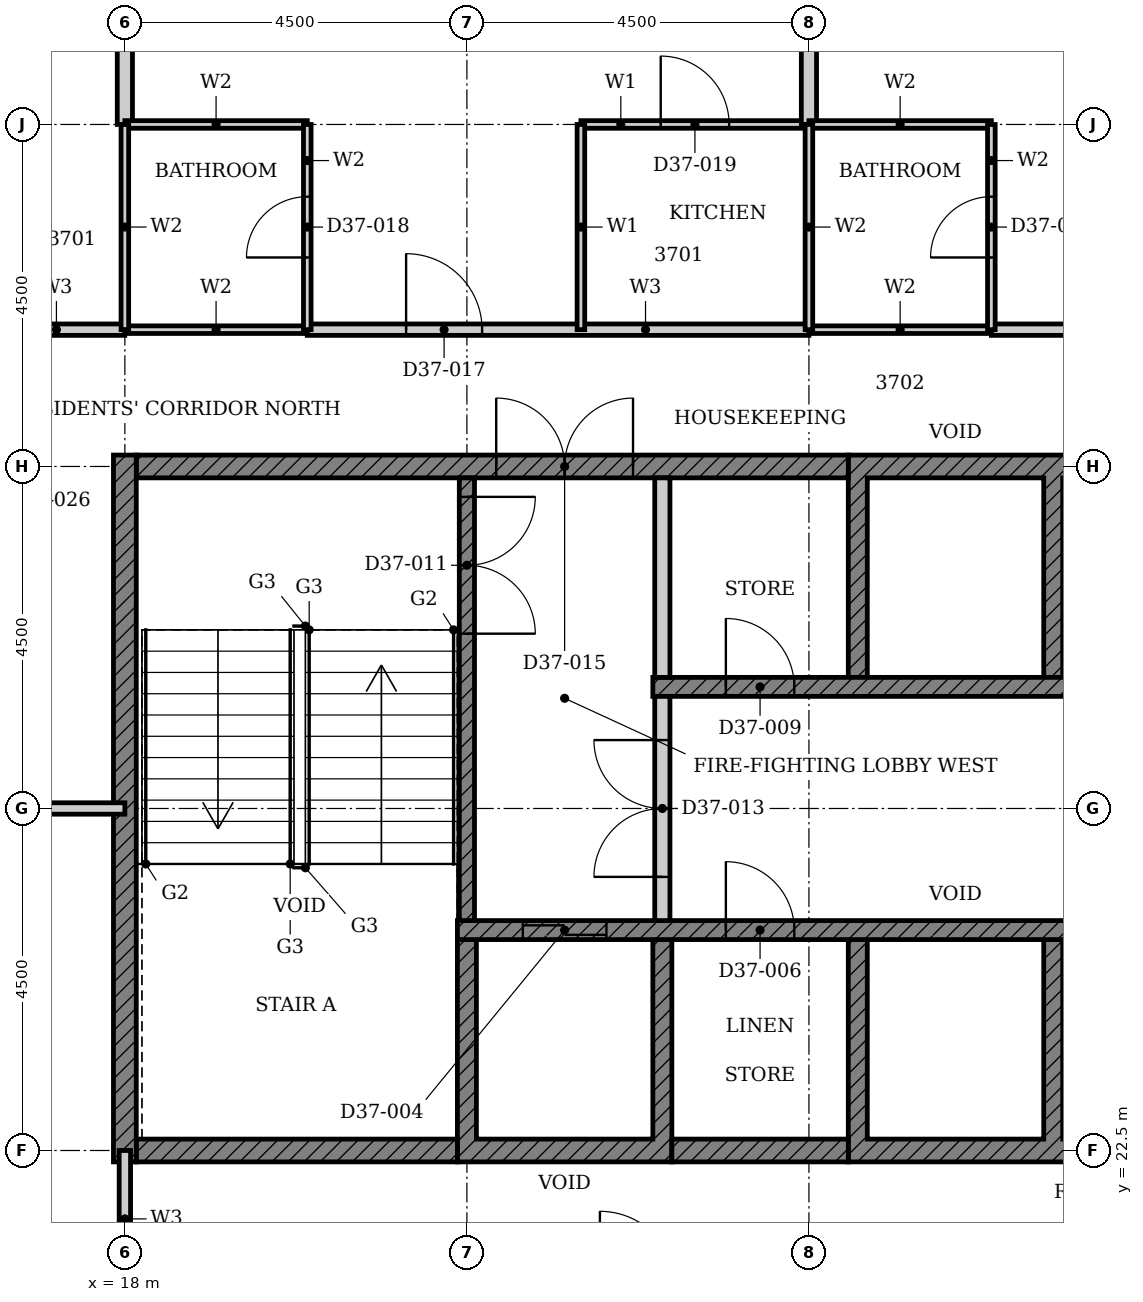
"""IFC4 building model, lengths in metres.
Left out: names, types, materials, properties, quantities, classifications, styles, units other than length and angle.
Written with IfcOpenShell. Run it as: python <this file> out.ifc"""

import sys

from ifc_helpers import new_model, si_unit, direction, frame, frame_2d, origin, place, context, subcontext, project, spatial, polyline, rectangle, outline, extrude, element, fill, save


model = new_model("IFC4")
c1 = context("Model", 3, precision=1e-05, world=origin(), true_north=direction((0.0, 1.0)))
c2 = subcontext(c1, "Body", "Model", "MODEL_VIEW")
j1 = project(units=[si_unit("LENGTHUNIT", "METRE"), si_unit("PLANEANGLEUNIT", "RADIAN")], contexts=[c1])
p1 = place(None, origin())
s1 = spatial("IfcSite", under=j1, at=p1, CompositionType="ELEMENT")
p2 = place(p1, origin())
s2 = spatial("IfcBuilding", under=s1, at=p2, CompositionType="ELEMENT")
p3 = place(p2, frame((0.0, 0.0, 150.6)))
s3 = spatial("IfcBuildingStorey", under=s2, at=p3, CompositionType="ELEMENT", Elevation=150.6)
p4 = place(p3, origin())
e1 = element("IfcWall", 1, at=p4, inside=s3, PredefinedType="SHEAR", context=c2, shape_type="SweptSolid", body=[
    extrude(outline(polyline([(22.375, 22.35), (25.197, 22.35), (25.197, 25.275), (24.947, 25.275), (24.947, 22.65), (22.625, 22.65), (22.625, 25.275), (22.375, 25.275), (22.375, 22.35)])), origin(), (0.0, 0.0, 1.0), 3.4),
])
p5 = place(p3, origin())
e2 = element("IfcWall", 2, at=p5, inside=s3, PredefinedType="SHEAR", context=c2, shape_type="SweptSolid", body=[
    extrude(outline(polyline([(27.518, 22.35), (32.911, 22.35), (32.911, 25.275), (32.661, 25.275), (32.661, 22.65), (30.339, 22.65), (30.339, 25.275), (30.089, 25.275), (30.089, 22.65), (27.768, 22.65), (27.768, 25.275), (27.518, 25.275), (27.518, 22.35)])), origin(), (0.0, 0.0, 1.0), 3.4),
])
p6 = place(p3, origin())
e3 = element("IfcWall", 3, at=p6, inside=s3, PredefinedType="SHEAR", context=c2, shape_type="SweptSolid", body=[
    extrude(outline(polyline([(27.518, 28.725), (27.768, 28.725), (27.768, 31.35), (30.089, 31.35), (30.089, 28.725), (30.339, 28.725), (30.339, 31.35), (32.661, 31.35), (32.661, 28.725), (32.911, 28.725), (32.911, 31.65), (27.518, 31.65), (27.518, 28.725)])), origin(), (0.0, 0.0, 1.0), 3.4),
])
p7 = place(p3, frame((18.15, 22.5, 0.0), z_axis=(0.0, 0.0, 1.0), x_axis=(1.0, 0.0, 0.0)))
e4 = element("IfcWall", 4, at=p7, inside=s3, PredefinedType="SHEAR", context=c2, shape_type="SweptSolid", body=[
    extrude(rectangle(XDim=4.225, YDim=0.3, at=frame_2d((2.113, 0.0))), origin(), (0.0, 0.0, 1.0), 3.4),
])
p8 = place(p3, frame((25.197, 22.5, 0.0), z_axis=(0.0, 0.0, 1.0), x_axis=(1.0, 0.0, 0.0)))
e5 = element("IfcWall", 5, at=p8, inside=s3, PredefinedType="SHEAR", context=c2, shape_type="SweptSolid", body=[
    extrude(rectangle(XDim=2.321, YDim=0.3, at=frame_2d((1.161, 0.0))), origin(), (0.0, 0.0, 1.0), 3.4),
])
p9 = place(p3, frame((18.15, 31.5, 0.0), z_axis=(0.0, 0.0, 1.0), x_axis=(1.0, 0.0, 0.0)))
e6 = element("IfcWall", 6, at=p9, inside=s3, PredefinedType="SHEAR", context=c2, shape_type="SweptSolid", body=[
    extrude(rectangle(XDim=9.368, YDim=0.3, at=frame_2d((4.684, 0.0))), origin(), (0.0, 0.0, 1.0), 3.4),
])
p10 = place(p9, frame((4.736, 0.0, 0.0)))
e7 = element("IfcOpeningElement", 7, at=p10, cuts=e6, PredefinedType="OPENING", context=c2, shape_type="SweptSolid", body=[
    extrude(rectangle(XDim=1.8, YDim=2.1, at=frame_2d((0.9, 1.05))), frame((0.0, 0.16, 0.0), z_axis=(0.0, -1.0, 0.0), x_axis=(1.0, 0.0, 0.0)), (0.0, 0.0, 1.0), 0.32),
])
p11 = place(p3, frame((18.0, 22.35, 0.0), z_axis=(0.0, 0.0, 1.0), x_axis=(0.0, 1.0, 0.0)))
e8 = element("IfcWall", 8, at=p11, inside=s3, PredefinedType="SHEAR", context=c2, shape_type="SweptSolid", body=[
    extrude(rectangle(XDim=9.3, YDim=0.3, at=frame_2d((4.65, 0.0))), origin(), (0.0, 0.0, 1.0), 3.4),
])
p12 = place(p3, frame((22.375, 25.4, 0.0), z_axis=(0.0, 0.0, 1.0), x_axis=(1.0, 0.0, 0.0)))
e9 = element("IfcWall", 9, at=p12, inside=s3, PredefinedType="SHEAR", context=c2, shape_type="SweptSolid", body=[
    extrude(rectangle(XDim=15.678, YDim=0.25, at=frame_2d((7.839, 0.0))), origin(), (0.0, 0.0, 1.0), 3.4),
])
p13 = place(p12, frame((8.575, 0.0, 0.0)))
e10 = element("IfcOpeningElement", 10, at=p13, cuts=e9, PredefinedType="OPENING", context=c2, shape_type="SweptSolid", body=[
    extrude(rectangle(XDim=1.1, YDim=2.1, at=frame_2d((0.55, 1.05))), frame((0.0, 0.135, 0.0), z_axis=(0.0, -1.0, 0.0), x_axis=(1.0, 0.0, 0.0)), (0.0, 0.0, 1.0), 0.27),
])
p14 = place(p12, frame((0.861, 0.0, 0.0)))
e11 = element("IfcOpeningElement", 11, at=p14, cuts=e9, PredefinedType="OPENING", context=c2, shape_type="SweptSolid", body=[
    extrude(rectangle(XDim=1.1, YDim=2.1, at=frame_2d((0.55, 1.05))), frame((0.0, 0.135, 0.0), z_axis=(0.0, -1.0, 0.0), x_axis=(1.0, 0.0, 0.0)), (0.0, 0.0, 1.0), 0.27),
])
p15 = place(p12, frame((3.532, 0.0, 0.0)))
e12 = element("IfcOpeningElement", 12, at=p15, cuts=e9, PredefinedType="OPENING", context=c2, shape_type="SweptSolid", body=[
    extrude(rectangle(XDim=0.9, YDim=2.1, at=frame_2d((0.45, 1.05))), frame((0.0, 0.135, 0.0), z_axis=(0.0, -1.0, 0.0), x_axis=(1.0, 0.0, 0.0)), (0.0, 0.0, 1.0), 0.27),
])
p16 = place(p12, frame((11.246, 0.0, 0.0)))
e13 = element("IfcOpeningElement", 13, at=p16, cuts=e9, PredefinedType="OPENING", context=c2, shape_type="SweptSolid", body=[
    extrude(rectangle(XDim=0.9, YDim=2.1, at=frame_2d((0.45, 1.05))), frame((0.0, 0.135, 0.0), z_axis=(0.0, -1.0, 0.0), x_axis=(1.0, 0.0, 0.0)), (0.0, 0.0, 1.0), 0.27),
])
p17 = place(p12, frame((13.818, 0.0, 0.0)))
e14 = element("IfcOpeningElement", 14, at=p17, cuts=e9, PredefinedType="OPENING", context=c2, shape_type="SweptSolid", body=[
    extrude(rectangle(XDim=0.9, YDim=2.1, at=frame_2d((0.45, 1.05))), frame((0.0, 0.135, 0.0), z_axis=(0.0, -1.0, 0.0), x_axis=(1.0, 0.0, 0.0)), (0.0, 0.0, 1.0), 0.27),
])
p18 = place(p3, frame((24.947, 28.6, 0.0), z_axis=(0.0, 0.0, 1.0), x_axis=(1.0, 0.0, 0.0)))
e15 = element("IfcWall", 15, at=p18, inside=s3, PredefinedType="SHEAR", context=c2, shape_type="SweptSolid", body=[
    extrude(rectangle(XDim=15.678, YDim=0.25, at=frame_2d((7.839, 0.0))), origin(), (0.0, 0.0, 1.0), 3.4),
])
p19 = place(p18, frame((6.004, 0.0, 0.0)))
e16 = element("IfcOpeningElement", 16, at=p19, cuts=e15, PredefinedType="OPENING", context=c2, shape_type="SweptSolid", body=[
    extrude(rectangle(XDim=1.1, YDim=2.1, at=frame_2d((0.55, 1.05))), frame((0.0, 0.135, 0.0), z_axis=(0.0, -1.0, 0.0), x_axis=(1.0, 0.0, 0.0)), (0.0, 0.0, 1.0), 0.27),
])
p20 = place(p18, frame((11.146, 0.0, 0.0)))
e17 = element("IfcOpeningElement", 17, at=p20, cuts=e15, PredefinedType="OPENING", context=c2, shape_type="SweptSolid", body=[
    extrude(rectangle(XDim=1.1, YDim=2.1, at=frame_2d((0.55, 1.05))), frame((0.0, 0.135, 0.0), z_axis=(0.0, -1.0, 0.0), x_axis=(1.0, 0.0, 0.0)), (0.0, 0.0, 1.0), 0.27),
])
p21 = place(p18, frame((13.718, 0.0, 0.0)))
e18 = element("IfcOpeningElement", 18, at=p21, cuts=e15, PredefinedType="OPENING", context=c2, shape_type="SweptSolid", body=[
    extrude(rectangle(XDim=1.1, YDim=2.1, at=frame_2d((0.55, 1.05))), frame((0.0, 0.135, 0.0), z_axis=(0.0, -1.0, 0.0), x_axis=(1.0, 0.0, 0.0)), (0.0, 0.0, 1.0), 0.27),
])
p22 = place(p18, frame((0.961, 0.0, 0.0)))
e19 = element("IfcOpeningElement", 19, at=p22, cuts=e15, PredefinedType="OPENING", context=c2, shape_type="SweptSolid", body=[
    extrude(rectangle(XDim=0.9, YDim=2.1, at=frame_2d((0.45, 1.05))), frame((0.0, 0.135, 0.0), z_axis=(0.0, -1.0, 0.0), x_axis=(1.0, 0.0, 0.0)), (0.0, 0.0, 1.0), 0.27),
])
p23 = place(p18, frame((8.675, 0.0, 0.0)))
e20 = element("IfcOpeningElement", 20, at=p23, cuts=e15, PredefinedType="OPENING", context=c2, shape_type="SweptSolid", body=[
    extrude(rectangle(XDim=0.9, YDim=2.1, at=frame_2d((0.45, 1.05))), frame((0.0, 0.135, 0.0), z_axis=(0.0, -1.0, 0.0), x_axis=(1.0, 0.0, 0.0)), (0.0, 0.0, 1.0), 0.27),
])
p24 = place(p3, frame((25.072, 28.725, 0.0), z_axis=(0.0, 0.0, 1.0), x_axis=(0.0, 1.0, 0.0)))
e21 = element("IfcWall", 21, at=p24, inside=s3, PredefinedType="PARTITIONING", context=c2, shape_type="SweptSolid", body=[
    extrude(rectangle(XDim=2.625, YDim=0.2, at=frame_2d((1.312, 0.0))), origin(), (0.0, 0.0, 1.0), 3.4),
])
p25 = place(p3, frame((22.5, 31.35, 0.0), z_axis=(0.0, 0.0, 1.0), x_axis=(0.0, -1.0, 0.0)))
e22 = element("IfcWall", 22, at=p25, inside=s3, PredefinedType="SHEAR", context=c2, shape_type="SweptSolid", body=[
    extrude(rectangle(XDim=5.825, YDim=0.2, at=frame_2d((2.913, 0.0))), origin(), (0.0, 0.0, 1.0), 3.4),
])
p26 = place(p25, frame((0.25, 0.0, 0.0)))
e23 = element("IfcOpeningElement", 23, at=p26, cuts=e22, PredefinedType="OPENING", context=c2, shape_type="SweptSolid", body=[
    extrude(rectangle(XDim=1.8, YDim=2.1, at=frame_2d((0.9, 1.05))), frame((0.0, 0.11, 0.0), z_axis=(0.0, -1.0, 0.0), x_axis=(1.0, 0.0, 0.0)), (0.0, 0.0, 1.0), 0.22),
])
p27 = place(p3, frame((25.072, 25.525, 0.0), z_axis=(0.0, 0.0, 1.0), x_axis=(0.0, 1.0, 0.0)))
e24 = element("IfcWall", 24, at=p27, inside=s3, PredefinedType="PARTITIONING", context=c2, shape_type="SweptSolid", body=[
    extrude(rectangle(XDim=2.95, YDim=0.2, at=frame_2d((1.475, 0.0))), origin(), (0.0, 0.0, 1.0), 3.4),
])
p28 = place(p27, frame((0.575, 0.0, 0.0)))
e25 = element("IfcOpeningElement", 25, at=p28, cuts=e24, PredefinedType="OPENING", context=c2, shape_type="SweptSolid", body=[
    extrude(rectangle(XDim=1.8, YDim=2.1, at=frame_2d((0.9, 1.05))), frame((0.0, 0.11, 0.0), z_axis=(0.0, -1.0, 0.0), x_axis=(1.0, 0.0, 0.0)), (0.0, 0.0, 1.0), 0.22),
])
p29 = place(p3, frame((4.5, 27.0, 0.0), z_axis=(0.0, 0.0, 1.0), x_axis=(1.0, 0.0, 0.0)))
e26 = element("IfcWall", 26, at=p29, inside=s3, PredefinedType="PARTITIONING", context=c2, shape_type="SweptSolid", body=[
    extrude(rectangle(XDim=13.5, YDim=0.15, at=frame_2d((6.75, 0.0))), origin(), (0.0, 0.0, 1.0), 2.68),
])
p30 = place(p29, frame((5.35, 0.0, 0.0)))
e27 = element("IfcOpeningElement", 27, at=p30, cuts=e26, PredefinedType="OPENING", context=c2, shape_type="SweptSolid", body=[
    extrude(rectangle(XDim=1.0, YDim=2.1, at=frame_2d((0.5, 1.05))), frame((0.0, 0.085, 0.0), z_axis=(0.0, -1.0, 0.0), x_axis=(1.0, 0.0, 0.0)), (0.0, 0.0, 1.0), 0.17),
])
p31 = place(p3, frame((20.4, 33.3, 0.0), z_axis=(0.0, 0.0, 1.0), x_axis=(1.0, 0.0, 0.0)))
e28 = element("IfcWall", 28, at=p31, inside=s3, PredefinedType="PARTITIONING", context=c2, shape_type="SweptSolid", body=[
    extrude(rectangle(XDim=6.6, YDim=0.15, at=frame_2d((3.3, 0.0))), origin(), (0.0, 0.0, 1.0), 3.4),
])
p32 = place(p31, frame((1.3, 0.0, 0.0)))
e29 = element("IfcOpeningElement", 29, at=p32, cuts=e28, PredefinedType="OPENING", context=c2, shape_type="SweptSolid", body=[
    extrude(rectangle(XDim=1.0, YDim=2.2, at=frame_2d((0.5, 1.1))), frame((0.0, 0.085, 0.0), z_axis=(0.0, -1.0, 0.0), x_axis=(1.0, 0.0, 0.0)), (0.0, 0.0, 1.0), 0.17),
])
p33 = place(p3, frame((29.4, 33.3, 0.0), z_axis=(0.0, 0.0, 1.0), x_axis=(1.0, 0.0, 0.0)))
e30 = element("IfcWall", 30, at=p33, inside=s3, PredefinedType="PARTITIONING", context=c2, shape_type="SweptSolid", body=[
    extrude(rectangle(XDim=6.6, YDim=0.15, at=frame_2d((3.3, 0.0))), origin(), (0.0, 0.0, 1.0), 3.4),
])
p34 = place(p33, frame((1.3, 0.0, 0.0)))
e31 = element("IfcOpeningElement", 31, at=p34, cuts=e30, PredefinedType="OPENING", context=c2, shape_type="SweptSolid", body=[
    extrude(rectangle(XDim=1.0, YDim=2.2, at=frame_2d((0.5, 1.1))), frame((0.0, 0.085, 0.0), z_axis=(0.0, -1.0, 0.0), x_axis=(1.0, 0.0, 0.0)), (0.0, 0.0, 1.0), 0.17),
])
p35 = place(p3, frame((16.2, 33.3, 0.0), z_axis=(0.0, 0.0, 1.0), x_axis=(1.0, 0.0, 0.0)))
e32 = element("IfcWall", 32, at=p35, inside=s3, PredefinedType="PARTITIONING", context=c2, shape_type="SweptSolid", body=[
    extrude(rectangle(XDim=1.799, YDim=0.15, at=frame_2d((0.899, 0.0))), origin(), (0.0, 0.0, 1.0), 3.4),
])
p36 = place(p3, frame((18.0, 20.7, 0.0), z_axis=(0.0, 0.0, 1.0), x_axis=(0.0, 1.0, 0.0)))
e33 = element("IfcWall", 33, at=p36, inside=s3, PredefinedType="PARTITIONING", context=c2, shape_type="SweptSolid", body=[
    extrude(rectangle(XDim=1.8, YDim=0.15, at=frame_2d((0.9, 0.0))), origin(), (0.0, 0.0, 1.0), 3.4),
])
p37 = place(p3, frame((24.0, 36.0, 0.0), z_axis=(0.0, 0.0, 1.0), x_axis=(1.0, 0.0, 0.0)))
e34 = element("IfcWall", 34, at=p37, inside=s3, PredefinedType="PARTITIONING", context=c2, shape_type="SweptSolid", body=[
    extrude(rectangle(XDim=3.0, YDim=0.1, at=frame_2d((1.5, 0.0))), origin(), (0.0, 0.0, 1.0), 3.4),
])
p38 = place(p37, frame((1.05, 0.0, 0.0)))
e35 = element("IfcOpeningElement", 35, at=p38, cuts=e34, PredefinedType="OPENING", context=c2, shape_type="SweptSolid", body=[
    extrude(rectangle(XDim=0.9, YDim=2.1, at=frame_2d((0.45, 1.05))), frame((0.0, 0.06, 0.0), z_axis=(0.0, -1.0, 0.0), x_axis=(1.0, 0.0, 0.0)), (0.0, 0.0, 1.0), 0.12),
])
p39 = place(p3, frame((24.0, 33.3, 0.0), z_axis=(0.0, 0.0, 1.0), x_axis=(0.0, 1.0, 0.0)))
e36 = element("IfcWall", 36, at=p39, inside=s3, PredefinedType="PARTITIONING", context=c2, shape_type="SweptSolid", body=[
    extrude(rectangle(XDim=2.7, YDim=0.1, at=frame_2d((1.35, 0.0))), origin(), (0.0, 0.0, 1.0), 3.4),
])
p40 = place(p3, frame((18.0, 36.0, 0.0), z_axis=(0.0, 0.0, 1.0), x_axis=(0.0, 1.0, 0.0)))
e37 = element("IfcWall", 37, at=p40, inside=s3, PredefinedType="PARTITIONING", context=c2, shape_type="SweptSolid", body=[
    extrude(rectangle(XDim=2.44, YDim=0.2, at=frame_2d((1.22, 0.0))), origin(), (0.0, 0.0, 1.0), 3.4),
])
p41 = place(p3, frame((27.0, 36.0, 0.0), z_axis=(0.0, 0.0, 1.0), x_axis=(0.0, 1.0, 0.0)))
e38 = element("IfcWall", 38, at=p41, inside=s3, PredefinedType="PARTITIONING", context=c2, shape_type="SweptSolid", body=[
    extrude(rectangle(XDim=4.69, YDim=0.2, at=frame_2d((2.345, 0.0))), origin(), (0.0, 0.0, 1.0), 3.4),
])
for number, where, z_axis, x_axis in (
    (39, (18.0, 33.3, 0.0), (0.0, 0.0, 1.0), (1.0, 0.0, 0.0)),
    (40, (27.0, 33.3, 0.0), (0.0, 0.0, 1.0), (1.0, 0.0, 0.0)),
    (41, (18.0, 36.0, 0.0), (0.0, 0.0, 1.0), (1.0, 0.0, 0.0)),
    (42, (27.0, 36.0, 0.0), (0.0, 0.0, 1.0), (1.0, 0.0, 0.0)),
):
    element("IfcWall", number, at=place(p3, frame(where, z_axis=z_axis, x_axis=x_axis)), inside=s3, PredefinedType="PARTITIONING", context=c2, shape_type="SweptSolid", body=[
        extrude(rectangle(XDim=2.4, YDim=0.1, at=frame_2d((1.2, 0.0))), origin(), (0.0, 0.0, 1.0), 3.4),
    ])
p42 = place(p3, frame((18.0, 33.301, 0.0), z_axis=(0.0, 0.0, 1.0), x_axis=(0.0, 1.0, 0.0)))
e43 = element("IfcWall", 43, at=p42, inside=s3, PredefinedType="PARTITIONING", context=c2, shape_type="SweptSolid", body=[
    extrude(rectangle(XDim=2.699, YDim=0.1, at=frame_2d((1.35, 0.0))), origin(), (0.0, 0.0, 1.0), 3.4),
])
p43 = place(p3, frame((20.4, 33.3, 0.0), z_axis=(0.0, 0.0, 1.0), x_axis=(0.0, 1.0, 0.0)))
e44 = element("IfcWall", 44, at=p43, inside=s3, PredefinedType="PARTITIONING", context=c2, shape_type="SweptSolid", body=[
    extrude(rectangle(XDim=2.7, YDim=0.1, at=frame_2d((1.35, 0.0))), origin(), (0.0, 0.0, 1.0), 3.4),
])
p44 = place(p43, frame((0.95, 0.0, 0.0)))
e45 = element("IfcOpeningElement", 45, at=p44, cuts=e44, PredefinedType="OPENING", context=c2, shape_type="SweptSolid", body=[
    extrude(rectangle(XDim=0.8, YDim=2.1, at=frame_2d((0.4, 1.05))), frame((0.0, 0.06, 0.0), z_axis=(0.0, -1.0, 0.0), x_axis=(1.0, 0.0, 0.0)), (0.0, 0.0, 1.0), 0.12),
])
p45 = place(p3, frame((27.0, 33.3, 0.0), z_axis=(0.0, 0.0, 1.0), x_axis=(0.0, 1.0, 0.0)))
e46 = element("IfcWall", 46, at=p45, inside=s3, PredefinedType="PARTITIONING", context=c2, shape_type="SweptSolid", body=[
    extrude(rectangle(XDim=2.7, YDim=0.1, at=frame_2d((1.35, 0.0))), origin(), (0.0, 0.0, 1.0), 3.4),
])
p46 = place(p3, frame((29.4, 33.3, 0.0), z_axis=(0.0, 0.0, 1.0), x_axis=(0.0, 1.0, 0.0)))
e47 = element("IfcWall", 47, at=p46, inside=s3, PredefinedType="PARTITIONING", context=c2, shape_type="SweptSolid", body=[
    extrude(rectangle(XDim=2.7, YDim=0.1, at=frame_2d((1.35, 0.0))), origin(), (0.0, 0.0, 1.0), 3.4),
])
p47 = place(p46, frame((0.95, 0.0, 0.0)))
e48 = element("IfcOpeningElement", 48, at=p47, cuts=e47, PredefinedType="OPENING", context=c2, shape_type="SweptSolid", body=[
    extrude(rectangle(XDim=0.8, YDim=2.1, at=frame_2d((0.4, 1.05))), frame((0.0, 0.06, 0.0), z_axis=(0.0, -1.0, 0.0), x_axis=(1.0, 0.0, 0.0)), (0.0, 0.0, 1.0), 0.12),
])
p48 = place(p14, origin())
e49 = element("IfcDoor", 49, at=p48, inside=s3, OperationType="DOUBLE_DOOR_SLIDING", PredefinedType="DOOR", context=c2, shape_type="SweptSolid", body=[
    extrude(rectangle(XDim=1.1, YDim=2.1, at=frame_2d((0.55, 1.05))), frame((0.0, 0.025, 0.0), z_axis=(0.0, -1.0, 0.0), x_axis=(1.0, 0.0, 0.0)), (0.0, 0.0, 1.0), 0.05),
])
fill(e11, e49)
p49 = place(p15, origin())
e50 = element("IfcDoor", 50, at=p49, inside=s3, OperationType="SINGLE_SWING_LEFT", PredefinedType="DOOR", context=c2, shape_type="SweptSolid", body=[
    extrude(rectangle(XDim=0.9, YDim=2.1, at=frame_2d((0.45, 1.05))), frame((0.0, 0.025, 0.0), z_axis=(0.0, -1.0, 0.0), x_axis=(1.0, 0.0, 0.0)), (0.0, 0.0, 1.0), 0.05),
])
fill(e12, e50)
p50 = place(p22, origin())
e51 = element("IfcDoor", 51, at=p50, inside=s3, OperationType="SINGLE_SWING_LEFT", PredefinedType="DOOR", context=c2, shape_type="SweptSolid", body=[
    extrude(rectangle(XDim=0.9, YDim=2.1, at=frame_2d((0.45, 1.05))), frame((0.0, 0.025, 0.0), z_axis=(0.0, -1.0, 0.0), x_axis=(1.0, 0.0, 0.0)), (0.0, 0.0, 1.0), 0.05),
])
fill(e19, e51)
p51 = place(p26, origin())
e52 = element("IfcDoor", 52, at=p51, inside=s3, OperationType="DOUBLE_DOOR_SINGLE_SWING", PredefinedType="DOOR", context=c2, shape_type="SweptSolid", body=[
    extrude(rectangle(XDim=1.8, YDim=2.1, at=frame_2d((0.9, 1.05))), frame((0.0, 0.025, 0.0), z_axis=(0.0, -1.0, 0.0), x_axis=(1.0, 0.0, 0.0)), (0.0, 0.0, 1.0), 0.05),
])
fill(e23, e52)
p52 = place(p28, origin())
e53 = element("IfcDoor", 53, at=p52, inside=s3, OperationType="DOUBLE_DOOR_SINGLE_SWING", PredefinedType="DOOR", context=c2, shape_type="SweptSolid", body=[
    extrude(rectangle(XDim=1.8, YDim=2.1, at=frame_2d((0.9, 1.05))), frame((0.0, 0.025, 0.0), z_axis=(0.0, -1.0, 0.0), x_axis=(1.0, 0.0, 0.0)), (0.0, 0.0, 1.0), 0.05),
])
fill(e25, e53)
p53 = place(p10, origin())
e54 = element("IfcDoor", 54, at=p53, inside=s3, OperationType="DOUBLE_DOOR_SINGLE_SWING", PredefinedType="DOOR", context=c2, shape_type="SweptSolid", body=[
    extrude(rectangle(XDim=1.8, YDim=2.1, at=frame_2d((0.9, 1.05))), frame((0.0, 0.025, 0.0), z_axis=(0.0, -1.0, 0.0), x_axis=(1.0, 0.0, 0.0)), (0.0, 0.0, 1.0), 0.05),
])
fill(e7, e54)
p54 = place(p32, origin())
e55 = element("IfcDoor", 55, at=p54, inside=s3, OperationType="SINGLE_SWING_LEFT", PredefinedType="DOOR", context=c2, shape_type="SweptSolid", body=[
    extrude(rectangle(XDim=1.0, YDim=2.2, at=frame_2d((0.5, 1.1))), frame((0.0, 0.025, 0.0), z_axis=(0.0, -1.0, 0.0), x_axis=(1.0, 0.0, 0.0)), (0.0, 0.0, 1.0), 0.05),
])
fill(e29, e55)
p55 = place(p44, origin())
e56 = element("IfcDoor", 56, at=p55, inside=s3, OperationType="SINGLE_SWING_LEFT", PredefinedType="DOOR", context=c2, shape_type="SweptSolid", body=[
    extrude(rectangle(XDim=0.8, YDim=2.1, at=frame_2d((0.4, 1.05))), frame((0.0, 0.025, 0.0), z_axis=(0.0, -1.0, 0.0), x_axis=(1.0, 0.0, 0.0)), (0.0, 0.0, 1.0), 0.05),
])
fill(e45, e56)
p56 = place(p38, origin())
e57 = element("IfcDoor", 57, at=p56, inside=s3, OperationType="SINGLE_SWING_LEFT", PredefinedType="DOOR", context=c2, shape_type="SweptSolid", body=[
    extrude(rectangle(XDim=0.9, YDim=2.1, at=frame_2d((0.45, 1.05))), frame((0.0, 0.025, 0.0), z_axis=(0.0, -1.0, 0.0), x_axis=(1.0, 0.0, 0.0)), (0.0, 0.0, 1.0), 0.05),
])
fill(e35, e57)
p57 = place(p47, origin())
e58 = element("IfcDoor", 58, at=p57, inside=s3, OperationType="SINGLE_SWING_RIGHT", PredefinedType="DOOR", context=c2, shape_type="SweptSolid", body=[
    extrude(rectangle(XDim=0.8, YDim=2.1, at=frame_2d((0.4, 1.05))), frame((0.0, 0.025, 0.0), z_axis=(0.0, -1.0, 0.0), x_axis=(1.0, 0.0, 0.0)), (0.0, 0.0, 1.0), 0.05),
])
fill(e48, e58)
save(model, sys.argv[1])
